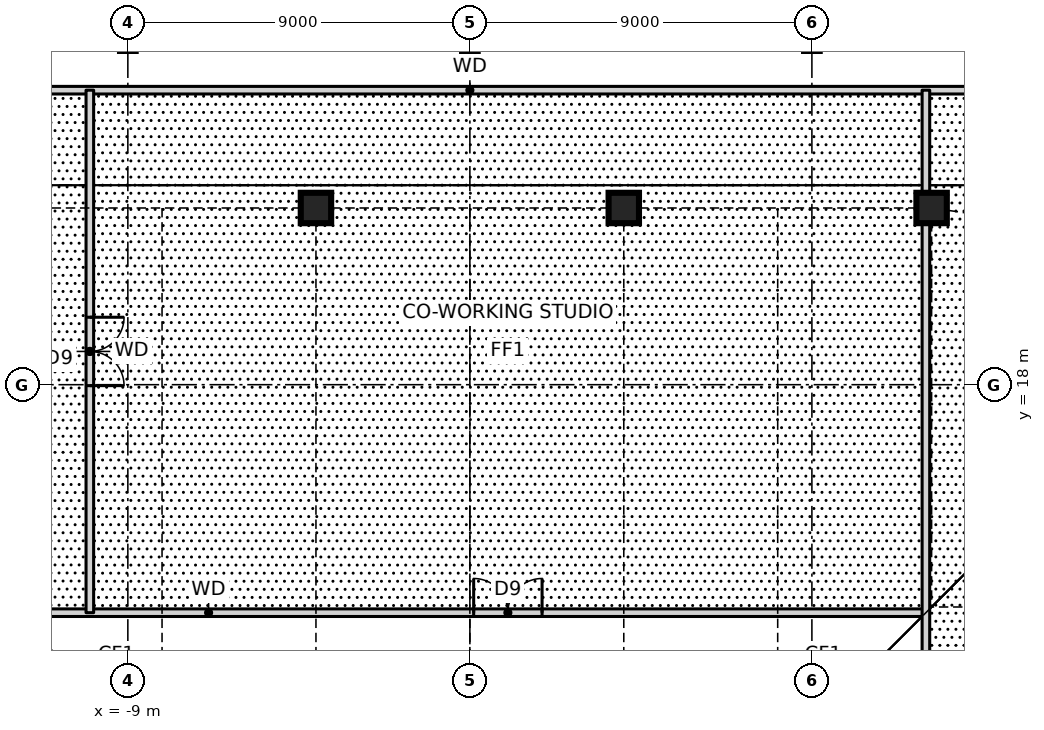
"""IFC4 building model, lengths in metres.
Left out: names, types, materials, properties, quantities, classifications, styles, units other than length and angle.
Written with IfcOpenShell. Run it as: python <this file> out.ifc"""

import sys

from ifc_helpers import new_model, si_unit, direction, frame, frame_2d, origin, origin_2d, place, context, subcontext, project, spatial, rectangle, hollow_rectangle, extrude, element, fill, save


model = new_model("IFC4")
c1 = context("Model", 3, precision=1e-05, world=origin(), true_north=direction((0.0, 1.0)))
c2 = subcontext(c1, "Body", "Model", "MODEL_VIEW")
j1 = project(units=[si_unit("LENGTHUNIT", "METRE"), si_unit("PLANEANGLEUNIT", "RADIAN")], contexts=[c1])
p1 = place(None, origin())
s1 = spatial("IfcSite", under=j1, at=p1, CompositionType="ELEMENT")
p2 = place(p1, origin())
s2 = spatial("IfcBuilding", under=s1, at=p2, CompositionType="ELEMENT")
p3 = place(p2, frame((0.0, 0.0, 6.0)))
s3 = spatial("IfcBuildingStorey", under=s2, at=p3, CompositionType="ELEMENT", Elevation=6.0)
for number, where, z_axis, x_axis in (
    (1, (12.15, 22.65, 0.0), (0.0, 0.0, 1.0), (1.0, 0.0, 0.0)),
    (2, (4.05, 22.65, 0.0), (0.0, 0.0, 1.0), (1.0, 0.0, 0.0)),
    (3, (-4.05, 22.65, 0.0), (0.0, 0.0, 1.0), (1.0, 0.0, 0.0)),
):
    element("IfcColumn", number, at=place(p3, frame(where, z_axis=z_axis, x_axis=x_axis)), inside=s3, PredefinedType="COLUMN", context=c2, shape_type="SweptSolid", body=[
        extrude(hollow_rectangle(XDim=0.8, YDim=0.8, WallThickness=0.09, at=origin_2d()), origin(), (0.0, 0.0, 1.0), 4.5),
    ])
p4 = place(p3, frame((-25.75, 12.0, 0.0), z_axis=(0.0, 0.0, 1.0), x_axis=(1.0, 0.0, 0.0)))
e4 = element("IfcWall", 4, at=p4, inside=s3, PredefinedType="SOLIDWALL", context=c2, shape_type="SweptSolid", body=[
    extrude(rectangle(XDim=37.75, YDim=0.2, at=frame_2d((18.875, 0.0))), origin(), (0.0, 0.0, 1.0), 4.25),
])
p5 = place(p4, frame((25.85, 0.0, 0.0)))
e5 = element("IfcOpeningElement", 5, at=p5, cuts=e4, PredefinedType="OPENING", context=c2, shape_type="SweptSolid", body=[
    extrude(rectangle(XDim=1.8, YDim=2.1, at=frame_2d((0.9, 1.05))), frame((0.0, 0.11, 0.0), z_axis=(0.0, -1.0, 0.0), x_axis=(1.0, 0.0, 0.0)), (0.0, 0.0, 1.0), 0.22),
])
p6 = place(p3, frame((-25.75, 25.75, 0.0), z_axis=(0.0, 0.0, 1.0), x_axis=(1.0, 0.0, 0.0)))
e6 = element("IfcWall", 6, at=p6, inside=s3, PredefinedType="SOLIDWALL", context=c2, shape_type="SweptSolid", body=[
    extrude(rectangle(XDim=51.5, YDim=0.2, at=frame_2d((25.75, 0.0))), origin(), (0.0, 0.0, 1.0), 4.25),
])
p7 = place(p3, frame((12.0, -12.0, 0.0), z_axis=(0.0, 0.0, 1.0), x_axis=(0.0, 1.0, 0.0)))
e7 = element("IfcWall", 7, at=p7, inside=s3, PredefinedType="SOLIDWALL", context=c2, shape_type="SweptSolid", body=[
    extrude(rectangle(XDim=37.75, YDim=0.2, at=frame_2d((18.875, 0.0))), origin(), (0.0, 0.0, 1.0), 4.25),
])
p8 = place(p7, frame((9.6, 0.0, 0.0)))
e8 = element("IfcOpeningElement", 8, at=p8, cuts=e7, PredefinedType="OPENING", context=c2, shape_type="SweptSolid", body=[
    extrude(rectangle(XDim=1.8, YDim=2.1, at=frame_2d((0.9, 1.05))), frame((0.0, 0.11, 0.0), z_axis=(0.0, -1.0, 0.0), x_axis=(1.0, 0.0, 0.0)), (0.0, 0.0, 1.0), 0.22),
])
p9 = place(p3, frame((-10.0, 12.0, 0.0), z_axis=(0.0, 0.0, 1.0), x_axis=(0.0, 1.0, 0.0)))
e9 = element("IfcWall", 9, at=p9, inside=s3, PredefinedType="SOLIDWALL", context=c2, shape_type="SweptSolid", body=[
    extrude(rectangle(XDim=13.75, YDim=0.2, at=frame_2d((6.875, 0.0))), origin(), (0.0, 0.0, 1.0), 4.25),
])
p10 = place(p9, frame((5.975, 0.0, 0.0)))
e10 = element("IfcOpeningElement", 10, at=p10, cuts=e9, PredefinedType="OPENING", context=c2, shape_type="SweptSolid", body=[
    extrude(rectangle(XDim=1.8, YDim=2.1, at=frame_2d((0.9, 1.05))), frame((0.0, 0.11, 0.0), z_axis=(0.0, -1.0, 0.0), x_axis=(1.0, 0.0, 0.0)), (0.0, 0.0, 1.0), 0.22),
])
p11 = place(p5, origin())
e11 = element("IfcDoor", 11, at=p11, inside=s3, OperationType="DOUBLE_DOOR_SINGLE_SWING", PredefinedType="DOOR", context=c2, shape_type="SweptSolid", body=[
    extrude(rectangle(XDim=1.8, YDim=2.1, at=frame_2d((0.9, 1.05))), frame((0.0, 0.025, 0.0), z_axis=(0.0, -1.0, 0.0), x_axis=(1.0, 0.0, 0.0)), (0.0, 0.0, 1.0), 0.05),
])
fill(e5, e11)
p12 = place(p10, frame((1.8, 0.0, 0.0), z_axis=(0.0, 0.0, 1.0), x_axis=(-1.0, 0.0, 0.0)))
e12 = element("IfcDoor", 12, at=p12, inside=s3, OperationType="DOUBLE_DOOR_SINGLE_SWING", PredefinedType="DOOR", context=c2, shape_type="SweptSolid", body=[
    extrude(rectangle(XDim=1.8, YDim=2.1, at=frame_2d((0.9, 1.05))), frame((0.0, 0.025, 0.0), z_axis=(0.0, -1.0, 0.0), x_axis=(1.0, 0.0, 0.0)), (0.0, 0.0, 1.0), 0.05),
])
fill(e10, e12)
save(model, sys.argv[1])
